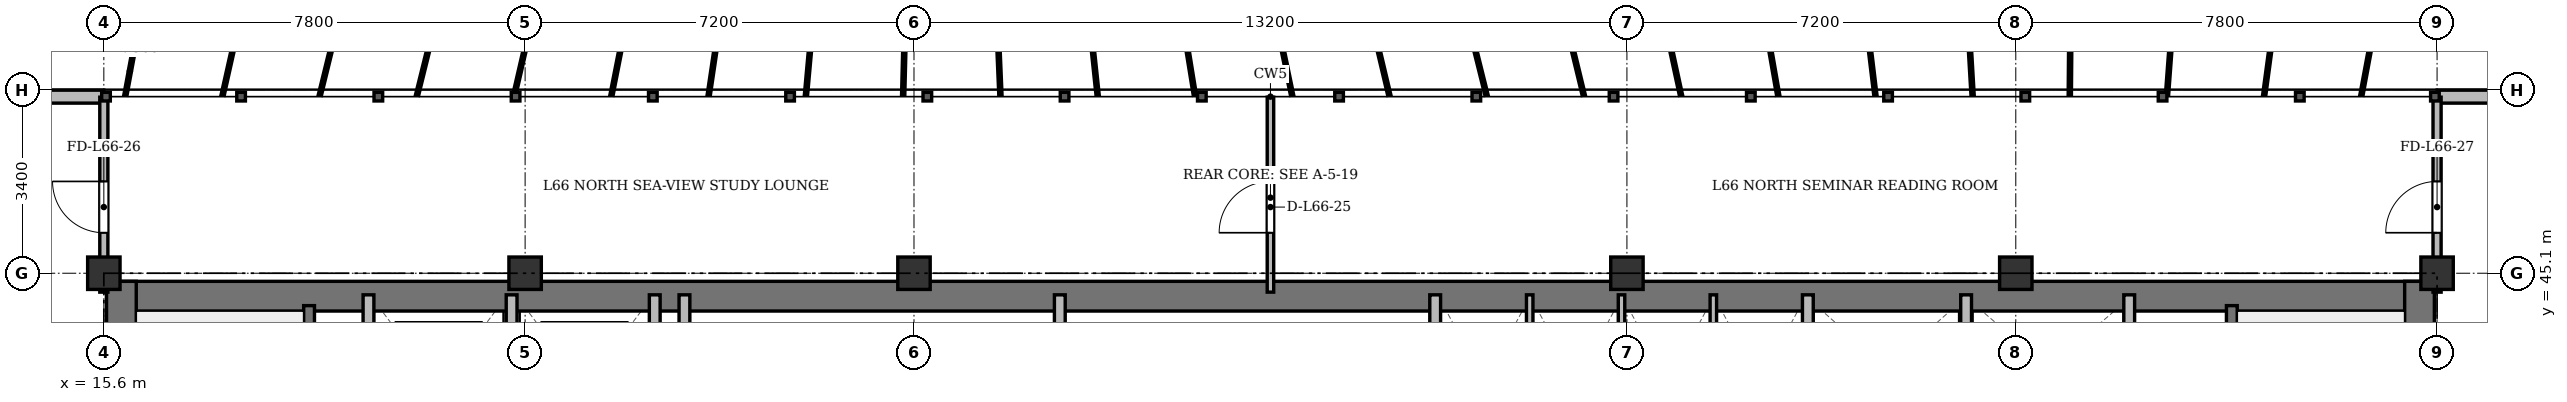
"""IFC4 building model, lengths in metres.
Left out: names, types, materials, properties, quantities, classifications, styles, units other than length and angle.
Written with IfcOpenShell. Run it as: python <this file> out.ifc"""

import sys

from ifc_helpers import new_model, si_unit, direction, frame, frame_2d, origin, origin_2d, place, context, subcontext, project, spatial, rectangle, extrude, source, transform, mapped, element, fill, save


model = new_model("IFC4")
c1 = context("Model", 3, precision=1e-05, world=origin(), true_north=direction((0.0, 1.0)))
c2 = subcontext(c1, "Body", "Model", "MODEL_VIEW")
j1 = project(units=[si_unit("LENGTHUNIT", "METRE"), si_unit("PLANEANGLEUNIT", "RADIAN")], contexts=[c1])
p1 = place(None, origin())
s1 = spatial("IfcSite", under=j1, at=p1, CompositionType="ELEMENT")
p2 = place(p1, origin())
s2 = spatial("IfcBuilding", under=s1, at=p2, CompositionType="ELEMENT")
p3 = place(p2, frame((0.0, 0.0, 255.9)))
s3 = spatial("IfcBuildingStorey", under=s2, at=p3, CompositionType="ELEMENT", Elevation=255.9)
m1 = source(origin(), c2, "Body", "SweptSolid", [
    extrude(rectangle(XDim=0.6, YDim=0.6, at=origin_2d()), origin(), (0.0, 0.0, 1.0), 3.6),
])
for number, where, z_axis, x_axis in (
    (1, (15.6, 45.1, 0.0), (0.0, 0.0, 1.0), (1.0, 0.0, 0.0)),
    (2, (23.4, 45.1, 0.0), (0.0, 0.0, 1.0), (1.0, 0.0, 0.0)),
    (3, (30.6, 45.1, 0.0), (0.0, 0.0, 1.0), (1.0, 0.0, 0.0)),
    (4, (43.8, 45.1, 0.0), (0.0, 0.0, 1.0), (1.0, 0.0, 0.0)),
    (5, (51.0, 45.1, 0.0), (0.0, 0.0, 1.0), (1.0, 0.0, 0.0)),
    (6, (58.8, 45.1, 0.0), (0.0, 0.0, 1.0), (1.0, 0.0, 0.0)),
):
    element("IfcColumn", number, at=place(p3, frame(where, z_axis=z_axis, x_axis=x_axis)), inside=s3, PredefinedType="COLUMN", context=c2, shape_type="MappedRepresentation", body=[
        mapped(m1, transform((0.0, 0.0, 0.0), x_axis=(1.0, 0.0, 0.0), y_axis=(0.0, 1.0, 0.0), z_axis=(0.0, 0.0, 1.0), scale=1.0)),
    ])
p4 = place(p3, frame((11.3, 48.37, 0.0), z_axis=(0.0, 0.0, 1.0), x_axis=(1.0, 0.0, 0.0)))
e7 = element("IfcWall", 7, at=p4, inside=s3, PredefinedType="SOLIDWALL", context=c2, shape_type="SweptSolid", body=[
    extrude(rectangle(XDim=4.3, YDim=0.24, at=frame_2d((2.15, 0.0))), origin(), (0.0, 0.0, 1.0), 3.37),
])
p5 = place(p4, frame((1.46, 0.0, 0.9)))
e8 = element("IfcOpeningElement", 8, at=p5, cuts=e7, PredefinedType="OPENING", context=c2, shape_type="SweptSolid", body=[
    extrude(rectangle(XDim=1.2, YDim=1.65, at=frame_2d((0.6, 0.825))), frame((0.0, 0.13, 0.0), z_axis=(0.0, -1.0, 0.0), x_axis=(1.0, 0.0, 0.0)), (0.0, 0.0, 1.0), 0.26),
])
p6 = place(p3, frame((58.8, 48.37, 0.0), z_axis=(0.0, 0.0, 1.0), x_axis=(1.0, 0.0, 0.0)))
e9 = element("IfcWall", 9, at=p6, inside=s3, PredefinedType="SOLIDWALL", context=c2, shape_type="SweptSolid", body=[
    extrude(rectangle(XDim=4.3, YDim=0.24, at=frame_2d((2.15, 0.0))), origin(), (0.0, 0.0, 1.0), 3.37),
])
p7 = place(p6, frame((1.46, 0.0, 0.9)))
e10 = element("IfcOpeningElement", 10, at=p7, cuts=e9, PredefinedType="OPENING", context=c2, shape_type="SweptSolid", body=[
    extrude(rectangle(XDim=1.2, YDim=1.65, at=frame_2d((0.6, 0.825))), frame((0.0, 0.13, 0.0), z_axis=(0.0, -1.0, 0.0), x_axis=(1.0, 0.0, 0.0)), (0.0, 0.0, 1.0), 0.26),
])
p8 = place(p3, frame((15.65, 44.675, 0.0), z_axis=(0.0, 0.0, 1.0), x_axis=(1.0, 0.0, 0.0)))
e11 = element("IfcWall", 11, at=p8, inside=s3, PredefinedType="SHEAR", context=c2, shape_type="SweptSolid", body=[
    extrude(rectangle(XDim=43.1, YDim=0.55, at=frame_2d((21.55, 0.0))), origin(), (0.0, 0.0, 1.0), 3.37),
])
for number, where, z_axis, x_axis in (
    (12, (15.925, 33.4, 0.0), (0.0, 0.0, 1.0), (0.0, 1.0, 0.0)),
    (13, (58.475, 33.4, 0.0), (0.0, 0.0, 1.0), (0.0, 1.0, 0.0)),
):
    element("IfcWall", number, at=place(p3, frame(where, z_axis=z_axis, x_axis=x_axis)), inside=s3, PredefinedType="SHEAR", context=c2, shape_type="SweptSolid", body=[
        extrude(rectangle(XDim=11.55, YDim=0.55, at=frame_2d((5.775, 0.0))), origin(), (0.0, 0.0, 1.0), 3.37),
    ])
p9 = place(p3, frame((19.4, 33.4, 0.0), z_axis=(0.0, 0.0, 1.0), x_axis=(0.0, 1.0, 0.0)))
e14 = element("IfcWall", 14, at=p9, inside=s3, PredefinedType="SHEAR", context=c2, shape_type="SweptSolid", body=[
    extrude(rectangle(XDim=11.1, YDim=0.2, at=frame_2d((5.55, 0.0))), origin(), (0.0, 0.0, 1.0), 3.37),
])
p10 = place(p9, frame((0.85, 0.0, 0.0)))
e15 = element("IfcOpeningElement", 15, at=p10, cuts=e14, PredefinedType="OPENING", context=c2, shape_type="SweptSolid", body=[
    extrude(rectangle(XDim=1.1, YDim=2.15, at=frame_2d((0.55, 1.075))), frame((0.0, 0.11, 0.0), z_axis=(0.0, -1.0, 0.0), x_axis=(1.0, 0.0, 0.0)), (0.0, 0.0, 1.0), 0.22),
])
p11 = place(p3, frame((55.0, 33.4, 0.0), z_axis=(0.0, 0.0, 1.0), x_axis=(0.0, 1.0, 0.0)))
e16 = element("IfcWall", 16, at=p11, inside=s3, PredefinedType="SHEAR", context=c2, shape_type="SweptSolid", body=[
    extrude(rectangle(XDim=11.1, YDim=0.2, at=frame_2d((5.55, 0.0))), origin(), (0.0, 0.0, 1.0), 3.37),
])
p12 = place(p11, frame((0.85, 0.0, 0.0)))
e17 = element("IfcOpeningElement", 17, at=p12, cuts=e16, PredefinedType="OPENING", context=c2, shape_type="SweptSolid", body=[
    extrude(rectangle(XDim=1.1, YDim=2.15, at=frame_2d((0.55, 1.075))), frame((0.0, 0.11, 0.0), z_axis=(0.0, -1.0, 0.0), x_axis=(1.0, 0.0, 0.0)), (0.0, 0.0, 1.0), 0.22),
])
for number, where, z_axis, x_axis in (
    (18, (20.5, 41.3, 0.0), (0.0, 0.0, 1.0), (0.0, 1.0, 0.0)),
    (19, (23.15, 41.3, 0.0), (0.0, 0.0, 1.0), (0.0, 1.0, 0.0)),
    (20, (25.8, 41.3, 0.0), (0.0, 0.0, 1.0), (0.0, 1.0, 0.0)),
):
    element("IfcWall", number, at=place(p3, frame(where, z_axis=z_axis, x_axis=x_axis)), inside=s3, PredefinedType="SOLIDWALL", context=c2, shape_type="SweptSolid", body=[
        extrude(rectangle(XDim=3.4, YDim=0.2, at=frame_2d((1.7, 0.0))), origin(), (0.0, 0.0, 1.0), 3.37),
    ])
for number, where, z_axis, x_axis in (
    (21, (26.35, 33.4, 0.0), (0.0, 0.0, 1.0), (0.0, 1.0, 0.0)),
    (22, (33.3, 33.4, 0.0), (0.0, 0.0, 1.0), (0.0, 1.0, 0.0)),
):
    element("IfcWall", number, at=place(p3, frame(where, z_axis=z_axis, x_axis=x_axis)), inside=s3, PredefinedType="SOLIDWALL", context=c2, shape_type="SweptSolid", body=[
        extrude(rectangle(XDim=11.3, YDim=0.2, at=frame_2d((5.65, 0.0))), origin(), (0.0, 0.0, 1.0), 2.92),
    ])
p13 = place(p3, frame((40.25, 41.5, 0.0), z_axis=(0.0, 0.0, 1.0), x_axis=(0.0, 1.0, 0.0)))
e23 = element("IfcWall", 23, at=p13, inside=s3, PredefinedType="SOLIDWALL", context=c2, shape_type="SweptSolid", body=[
    extrude(rectangle(XDim=3.2, YDim=0.2, at=frame_2d((1.6, 0.0))), origin(), (0.0, 0.0, 1.0), 3.37),
])
for number, where, z_axis, x_axis in (
    (24, (42.0, 41.5, 0.0), (0.0, 0.0, 1.0), (0.0, 1.0, 0.0)),
    (25, (43.7, 41.5, 0.0), (0.0, 0.0, 1.0), (0.0, 1.0, 0.0)),
    (26, (45.4, 41.5, 0.0), (0.0, 0.0, 1.0), (0.0, 1.0, 0.0)),
):
    element("IfcWall", number, at=place(p3, frame(where, z_axis=z_axis, x_axis=x_axis)), inside=s3, PredefinedType="PARTITIONING", context=c2, shape_type="SweptSolid", body=[
        extrude(rectangle(XDim=3.2, YDim=0.12, at=frame_2d((1.6, 0.0))), origin(), (0.0, 0.0, 1.0), 3.37),
    ])
p14 = place(p3, frame((47.15, 33.4, 0.0), z_axis=(0.0, 0.0, 1.0), x_axis=(0.0, 1.0, 0.0)))
e27 = element("IfcWall", 27, at=p14, inside=s3, PredefinedType="SOLIDWALL", context=c2, shape_type="SweptSolid", body=[
    extrude(rectangle(XDim=11.3, YDim=0.2, at=frame_2d((5.65, 0.0))), origin(), (0.0, 0.0, 1.0), 2.92),
])
for number, where, z_axis, x_axis in (
    (28, (50.08, 42.05, 0.0), (0.0, 0.0, 1.0), (0.0, 1.0, 0.0)),
    (29, (53.1, 42.05, 0.0), (0.0, 0.0, 1.0), (0.0, 1.0, 0.0)),
):
    element("IfcWall", number, at=place(p3, frame(where, z_axis=z_axis, x_axis=x_axis)), inside=s3, PredefinedType="SOLIDWALL", context=c2, shape_type="SweptSolid", body=[
        extrude(rectangle(XDim=2.65, YDim=0.2, at=frame_2d((1.325, 0.0))), origin(), (0.0, 0.0, 1.0), 3.37),
    ])
p15 = place(p3, frame((37.2, 44.75, 0.0), z_axis=(0.0, 0.0, 1.0), x_axis=(0.0, 1.0, 0.0)))
e30 = element("IfcWall", 30, at=p15, inside=s3, PredefinedType="PARTITIONING", context=c2, shape_type="SweptSolid", body=[
    extrude(rectangle(XDim=3.61, YDim=0.12, at=frame_2d((1.805, 0.0))), origin(), (0.0, 0.0, 1.0), 2.92),
])
p16 = place(p15, frame((1.1, 0.0, 0.0)))
e31 = element("IfcOpeningElement", 31, at=p16, cuts=e30, PredefinedType="OPENING", context=c2, shape_type="SweptSolid", body=[
    extrude(rectangle(XDim=0.95, YDim=2.15, at=frame_2d((0.475, 1.075))), frame((0.0, 0.07, 0.0), z_axis=(0.0, -1.0, 0.0), x_axis=(1.0, 0.0, 0.0)), (0.0, 0.0, 1.0), 0.14),
])
p17 = place(p3, frame((15.6, 44.75, 0.0), z_axis=(0.0, 0.0, 1.0), x_axis=(0.0, 1.0, 0.0)))
e32 = element("IfcWall", 32, at=p17, inside=s3, PredefinedType="PARTITIONING", context=c2, shape_type="SweptSolid", body=[
    extrude(rectangle(XDim=3.61, YDim=0.15, at=frame_2d((1.805, 0.0))), origin(), (0.0, 0.0, 1.0), 2.87),
])
p18 = place(p17, frame((1.1, 0.0, 0.0)))
e33 = element("IfcOpeningElement", 33, at=p18, cuts=e32, PredefinedType="OPENING", context=c2, shape_type="SweptSolid", body=[
    extrude(rectangle(XDim=0.95, YDim=2.15, at=frame_2d((0.475, 1.075))), frame((0.0, 0.085, 0.0), z_axis=(0.0, -1.0, 0.0), x_axis=(1.0, 0.0, 0.0)), (0.0, 0.0, 1.0), 0.17),
])
p19 = place(p3, frame((58.8, 44.75, 0.0), z_axis=(0.0, 0.0, 1.0), x_axis=(0.0, 1.0, 0.0)))
e34 = element("IfcWall", 34, at=p19, inside=s3, PredefinedType="PARTITIONING", context=c2, shape_type="SweptSolid", body=[
    extrude(rectangle(XDim=3.61, YDim=0.15, at=frame_2d((1.805, 0.0))), origin(), (0.0, 0.0, 1.0), 2.87),
])
p20 = place(p19, frame((1.1, 0.0, 0.0)))
e35 = element("IfcOpeningElement", 35, at=p20, cuts=e34, PredefinedType="OPENING", context=c2, shape_type="SweptSolid", body=[
    extrude(rectangle(XDim=0.95, YDim=2.15, at=frame_2d((0.475, 1.075))), frame((0.0, 0.085, 0.0), z_axis=(0.0, -1.0, 0.0), x_axis=(1.0, 0.0, 0.0)), (0.0, 0.0, 1.0), 0.17),
])
m2 = source(origin(), c2, "Body", "SweptSolid", [
    extrude(rectangle(XDim=0.95, YDim=2.15, at=frame_2d((0.475, 1.075))), frame((0.0, 0.025, 0.0), z_axis=(0.0, -1.0, 0.0), x_axis=(1.0, 0.0, 0.0)), (0.0, 0.0, 1.0), 0.05),
])
p21 = place(p16, origin())
e36 = element("IfcDoor", 36, at=p21, inside=s3, OperationType="SINGLE_SWING_LEFT", PredefinedType="DOOR", context=c2, shape_type="MappedRepresentation", body=[
    mapped(m2, transform((0.0, 0.0, 0.0), x_axis=(1.0, 0.0, 0.0), y_axis=(0.0, 1.0, 0.0), z_axis=(0.0, 0.0, 1.0), scale=1.0)),
])
fill(e31, e36)
p22 = place(p18, origin())
e37 = element("IfcDoor", 37, at=p22, inside=s3, OperationType="SINGLE_SWING_RIGHT", PredefinedType="DOOR", context=c2, shape_type="MappedRepresentation", body=[
    mapped(m2, transform((0.0, 0.0, 0.0), x_axis=(1.0, 0.0, 0.0), y_axis=(0.0, 1.0, 0.0), z_axis=(0.0, 0.0, 1.0), scale=1.0)),
])
fill(e33, e37)
p23 = place(p20, origin())
e38 = element("IfcDoor", 38, at=p23, inside=s3, OperationType="SINGLE_SWING_LEFT", PredefinedType="DOOR", context=c2, shape_type="MappedRepresentation", body=[
    mapped(m2, transform((0.0, 0.0, 0.0), x_axis=(1.0, 0.0, 0.0), y_axis=(0.0, 1.0, 0.0), z_axis=(0.0, 0.0, 1.0), scale=1.0)),
])
fill(e35, e38)
save(model, sys.argv[1])
